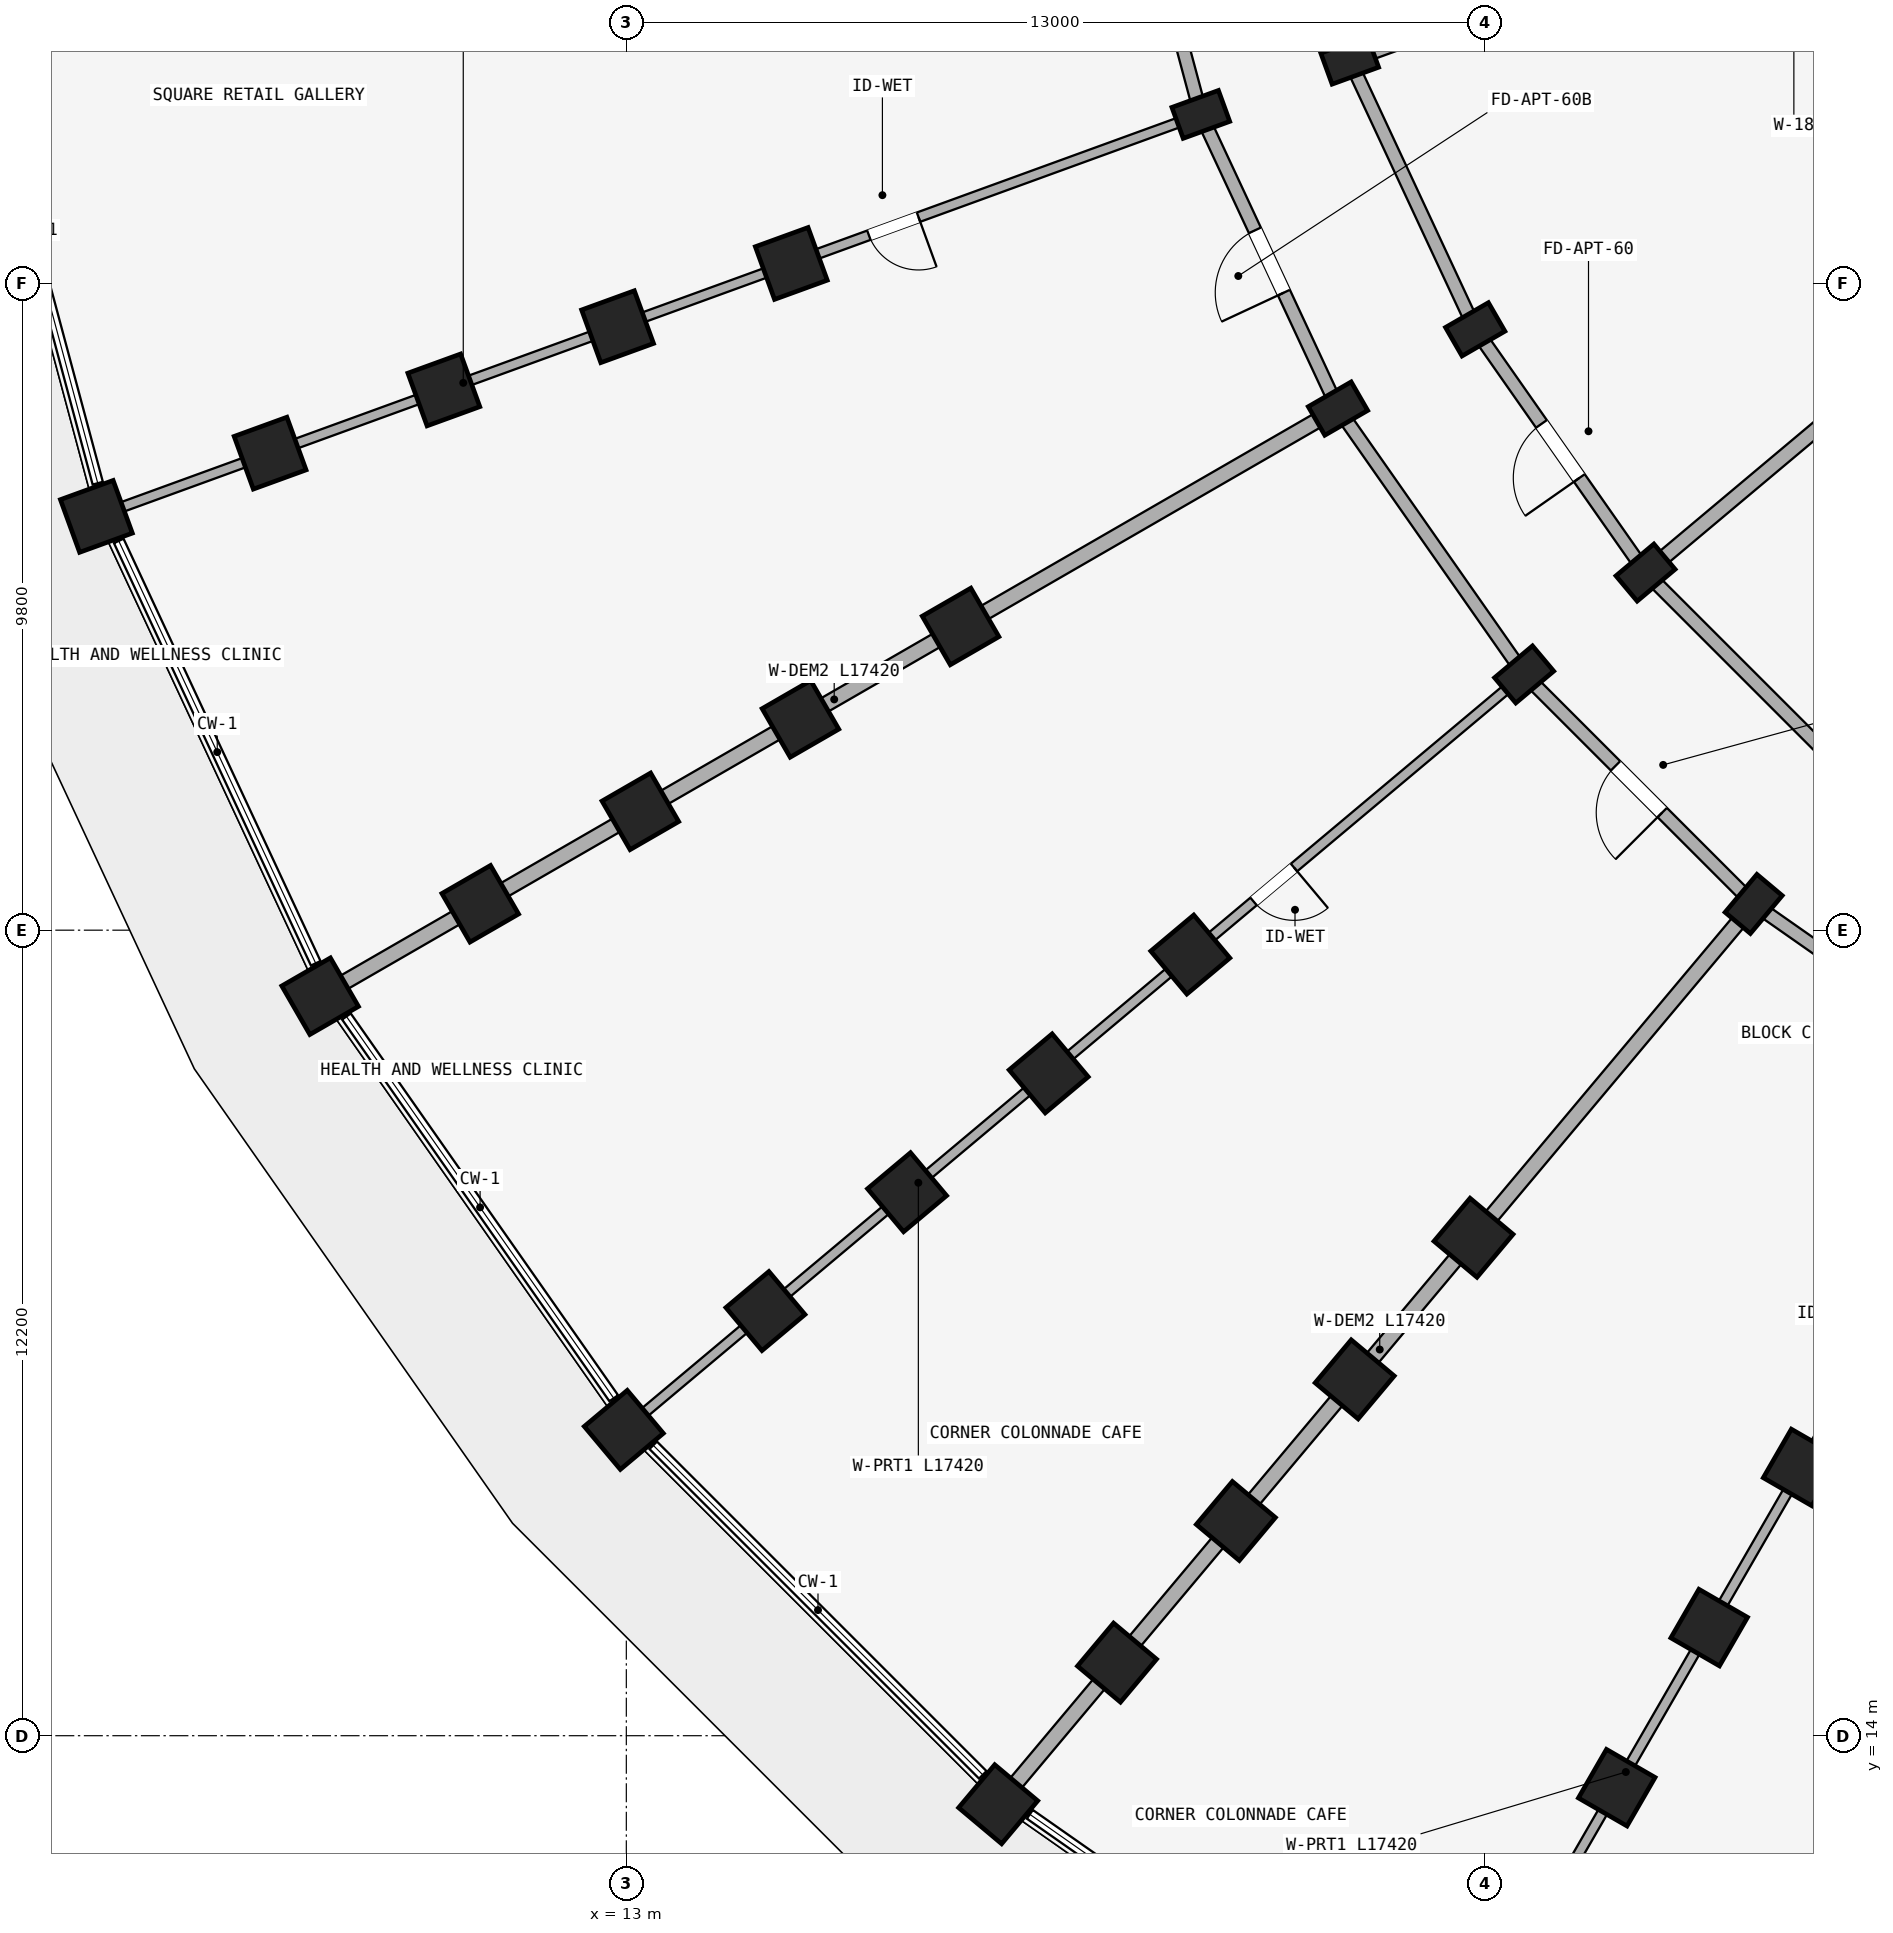
"""IFC4 building model, lengths in metres.
Left out: names, types, materials, properties, quantities, classifications, styles, units other than length and angle.
Written with IfcOpenShell. Run it as: python <this file> out.ifc"""

import sys

from ifc_helpers import new_model, si_unit, direction, frame, frame_2d, origin, origin_2d, place, context, subcontext, project, spatial, rectangle, extrude, element, fill, save


model = new_model("IFC4")
c1 = context("Model", 3, precision=1e-05, world=origin(), true_north=direction((0.0, 1.0)))
c2 = subcontext(c1, "Body", "Model", "MODEL_VIEW")
j1 = project(units=[si_unit("LENGTHUNIT", "METRE"), si_unit("PLANEANGLEUNIT", "RADIAN")], contexts=[c1])
p1 = place(None, origin())
s1 = spatial("IfcSite", under=j1, at=p1, CompositionType="ELEMENT")
p2 = place(p1, origin())
s2 = spatial("IfcBuilding", under=s1, at=p2, CompositionType="ELEMENT")
p3 = place(p2, origin())
s3 = spatial("IfcBuildingStorey", under=s2, at=p3, CompositionType="ELEMENT", Elevation=0.0)
for number, where, z_axis, x_axis in (
    (1, (30.8, 18.062, 0.0), (0.0, 0.0, 1.0), (-0.866, 0.5, 0.0)),
    (2, (29.4, 15.637, 0.0), (0.0, 0.0, 1.0), (-0.866, 0.5, 0.0)),
    (3, (28.0, 13.213, 0.0), (0.0, 0.0, 1.0), (-0.866, 0.5, 0.0)),
):
    element("IfcColumn", number, at=place(p3, frame(where, z_axis=z_axis, x_axis=x_axis)), inside=s3, PredefinedType="COLUMN", context=c2, shape_type="SweptSolid", body=[
        extrude(rectangle(XDim=0.85, YDim=0.85, at=origin_2d()), origin(), (0.0, 0.0, 1.0), 4.15),
    ])
p4 = place(p3, frame((30.073, 26.598, 0.0), z_axis=(0.0, 0.0, 1.0), x_axis=(-0.766044443119, 0.642787609687, 0.0)))
e4 = element("IfcColumn", 4, at=p4, inside=s3, PredefinedType="COLUMN", context=c2, shape_type="SweptSolid", body=[
    extrude(rectangle(XDim=0.5, YDim=0.75, at=origin_2d()), origin(), (0.0, 0.0, 1.0), 4.15),
])
for number, where, z_axis, x_axis in (
    (5, (25.831, 21.542, 0.0), (0.0, 0.0, 1.0), (-0.766, 0.643, 0.0)),
    (6, (24.031, 19.397, 0.0), (0.0, 0.0, 1.0), (-0.766, 0.643, 0.0)),
    (7, (22.231, 17.252, 0.0), (0.0, 0.0, 1.0), (-0.766, 0.643, 0.0)),
    (8, (20.432, 15.107, 0.0), (0.0, 0.0, 1.0), (-0.766, 0.643, 0.0)),
    (9, (18.632, 12.962, 0.0), (0.0, 0.0, 1.0), (-0.766, 0.643, 0.0)),
):
    element("IfcColumn", number, at=place(p3, frame(where, z_axis=z_axis, x_axis=x_axis)), inside=s3, PredefinedType="COLUMN", context=c2, shape_type="SweptSolid", body=[
        extrude(rectangle(XDim=0.85, YDim=0.85, at=origin_2d()), origin(), (0.0, 0.0, 1.0), 4.15),
    ])
for number, where, z_axis, x_axis in (
    (10, (28.436, 31.616, 0.0), (0.0, 0.0, 1.0), (-0.643, 0.766, 0.0)),
    (11, (26.598, 30.073, 0.0), (0.0, 0.0, 1.0), (-0.643, 0.766, 0.0)),
):
    element("IfcColumn", number, at=place(p3, frame(where, z_axis=z_axis, x_axis=x_axis)), inside=s3, PredefinedType="COLUMN", context=c2, shape_type="SweptSolid", body=[
        extrude(rectangle(XDim=0.5, YDim=0.75, at=origin_2d()), origin(), (0.0, 0.0, 1.0), 4.15),
    ])
for number, where, z_axis, x_axis in (
    (12, (21.542, 25.831, 0.0), (0.0, 0.0, 1.0), (-0.643, 0.766, 0.0)),
    (13, (19.397, 24.031, 0.0), (0.0, 0.0, 1.0), (-0.643, 0.766, 0.0)),
    (14, (17.252, 22.231, 0.0), (0.0, 0.0, 1.0), (-0.643, 0.766, 0.0)),
    (15, (15.107, 20.432, 0.0), (0.0, 0.0, 1.0), (-0.643, 0.766, 0.0)),
    (16, (12.962, 18.632, 0.0), (0.0, 0.0, 1.0), (-0.643, 0.766, 0.0)),
):
    element("IfcColumn", number, at=place(p3, frame(where, z_axis=z_axis, x_axis=x_axis)), inside=s3, PredefinedType="COLUMN", context=c2, shape_type="SweptSolid", body=[
        extrude(rectangle(XDim=0.85, YDim=0.85, at=origin_2d()), origin(), (0.0, 0.0, 1.0), 4.15),
    ])
for number, where, z_axis, x_axis in (
    (17, (25.856, 35.3, 0.0), (0.0, 0.0, 1.0), (-0.5, 0.866, 0.0)),
    (18, (23.778, 34.1, 0.0), (0.0, 0.0, 1.0), (-0.5, 0.866, 0.0)),
):
    element("IfcColumn", number, at=place(p3, frame(where, z_axis=z_axis, x_axis=x_axis)), inside=s3, PredefinedType="COLUMN", context=c2, shape_type="SweptSolid", body=[
        extrude(rectangle(XDim=0.5, YDim=0.75, at=origin_2d()), origin(), (0.0, 0.0, 1.0), 4.15),
    ])
for number, where, z_axis, x_axis in (
    (19, (18.062, 30.8, 0.0), (0.0, 0.0, 1.0), (-0.5, 0.866, 0.0)),
    (20, (15.637, 29.4, 0.0), (0.0, 0.0, 1.0), (-0.5, 0.866, 0.0)),
    (21, (13.213, 28.0, 0.0), (0.0, 0.0, 1.0), (-0.5, 0.866, 0.0)),
    (22, (10.788, 26.6, 0.0), (0.0, 0.0, 1.0), (-0.5, 0.866, 0.0)),
    (23, (8.363, 25.2, 0.0), (0.0, 0.0, 1.0), (-0.5, 0.866, 0.0)),
):
    element("IfcColumn", number, at=place(p3, frame(where, z_axis=z_axis, x_axis=x_axis)), inside=s3, PredefinedType="COLUMN", context=c2, shape_type="SweptSolid", body=[
        extrude(rectangle(XDim=0.85, YDim=0.85, at=origin_2d()), origin(), (0.0, 0.0, 1.0), 4.15),
    ])
for number, where, z_axis, x_axis in (
    (24, (23.956, 39.376, 0.0), (0.0, 0.0, 1.0), (-0.342, 0.94, 0.0)),
    (25, (21.701, 38.555, 0.0), (0.0, 0.0, 1.0), (-0.342, 0.94, 0.0)),
):
    element("IfcColumn", number, at=place(p3, frame(where, z_axis=z_axis, x_axis=x_axis)), inside=s3, PredefinedType="COLUMN", context=c2, shape_type="SweptSolid", body=[
        extrude(rectangle(XDim=0.5, YDim=0.75, at=origin_2d()), origin(), (0.0, 0.0, 1.0), 4.15),
    ])
for number, where, z_axis, x_axis in (
    (26, (15.499, 36.298, 0.0), (0.0, 0.0, 1.0), (-0.342, 0.94, 0.0)),
    (27, (12.868, 35.34, 0.0), (0.0, 0.0, 1.0), (-0.342, 0.94, 0.0)),
    (28, (10.236, 34.382, 0.0), (0.0, 0.0, 1.0), (-0.342, 0.94, 0.0)),
    (29, (7.605, 33.425, 0.0), (0.0, 0.0, 1.0), (-0.342, 0.94, 0.0)),
    (30, (4.974, 32.467, 0.0), (0.0, 0.0, 1.0), (-0.342, 0.94, 0.0)),
):
    element("IfcColumn", number, at=place(p3, frame(where, z_axis=z_axis, x_axis=x_axis)), inside=s3, PredefinedType="COLUMN", context=c2, shape_type="SweptSolid", body=[
        extrude(rectangle(XDim=0.85, YDim=0.85, at=origin_2d()), origin(), (0.0, 0.0, 1.0), 4.15),
    ])
p5 = place(p3, frame((34.1, 23.778, 0.0), z_axis=(0.0, 0.0, 1.0), x_axis=(-0.819140911474, 0.573592335331, 0.0)))
e31 = element("IfcWall", 31, at=p5, inside=s3, PredefinedType="STANDARD", context=c2, shape_type="SweptSolid", body=[
    extrude(rectangle(XDim=4.916, YDim=0.2, at=frame_2d((2.458, 0.0))), origin(), (0.0, 0.0, 1.0), 3.492),
])
p6 = place(p3, frame((31.616, 28.436, 0.0), z_axis=(0.0, 0.0, 1.0), x_axis=(-0.707106781187, 0.707106781187, 0.0)))
e32 = element("IfcWall", 32, at=p6, inside=s3, PredefinedType="STANDARD", context=c2, shape_type="SweptSolid", body=[
    extrude(rectangle(XDim=4.497, YDim=0.2, at=frame_2d((2.249, 0.0))), origin(), (0.0, 0.0, 1.0), 3.492),
])
p7 = place(p3, frame((30.073, 26.598, 0.0), z_axis=(0.0, 0.0, 1.0), x_axis=(-0.707106781187, 0.707106781187, 0.0)))
e33 = element("IfcWall", 33, at=p7, inside=s3, PredefinedType="STANDARD", context=c2, shape_type="SweptSolid", body=[
    extrude(rectangle(XDim=4.916, YDim=0.2, at=frame_2d((2.458, 0.0))), origin(), (0.0, 0.0, 1.0), 3.492),
])
p8 = place(p7, frame((1.958, 0.0, 0.0)))
e34 = element("IfcOpeningElement", 34, at=p8, cuts=e33, PredefinedType="OPENING", context=c2, shape_type="SweptSolid", body=[
    extrude(rectangle(XDim=1.0, YDim=2.15, at=frame_2d((0.5, 1.075))), frame((0.0, 0.11, 0.0), z_axis=(0.0, -1.0, 0.0), x_axis=(1.0, 0.0, 0.0)), (0.0, 0.0, 1.0), 0.22),
])
p9 = place(p3, frame((28.436, 31.616, 0.0), z_axis=(0.0, 0.0, 1.0), x_axis=(-0.573571637217, 0.819155404658, 0.0)))
e35 = element("IfcWall", 35, at=p9, inside=s3, PredefinedType="STANDARD", context=c2, shape_type="SweptSolid", body=[
    extrude(rectangle(XDim=4.497, YDim=0.2, at=frame_2d((2.249, 0.0))), origin(), (0.0, 0.0, 1.0), 3.492),
])
p10 = place(p9, frame((1.749, 0.0, 0.0)))
e36 = element("IfcOpeningElement", 36, at=p10, cuts=e35, PredefinedType="OPENING", context=c2, shape_type="SweptSolid", body=[
    extrude(rectangle(XDim=1.0, YDim=2.15, at=frame_2d((0.5, 1.075))), frame((0.0, 0.11, 0.0), z_axis=(0.0, -1.0, 0.0), x_axis=(1.0, 0.0, 0.0)), (0.0, 0.0, 1.0), 0.22),
])
p11 = place(p3, frame((26.598, 30.073, 0.0), z_axis=(0.0, 0.0, 1.0), x_axis=(-0.573592335331, 0.819140911474, 0.0)))
e37 = element("IfcWall", 37, at=p11, inside=s3, PredefinedType="STANDARD", context=c2, shape_type="SweptSolid", body=[
    extrude(rectangle(XDim=4.916, YDim=0.2, at=frame_2d((2.458, 0.0))), origin(), (0.0, 0.0, 1.0), 3.492),
])
p12 = place(p3, frame((25.856, 35.3, 0.0), z_axis=(0.0, 0.0, 1.0), x_axis=(-0.422617978463, 0.906307919131, 0.0)))
e38 = element("IfcWall", 38, at=p12, inside=s3, PredefinedType="STANDARD", context=c2, shape_type="SweptSolid", body=[
    extrude(rectangle(XDim=4.497, YDim=0.2, at=frame_2d((2.249, 0.0))), origin(), (0.0, 0.0, 1.0), 3.492),
])
p13 = place(p3, frame((23.778, 34.1, 0.0), z_axis=(0.0, 0.0, 1.0), x_axis=(-0.422629854778, 0.906302381024, 0.0)))
e39 = element("IfcWall", 39, at=p13, inside=s3, PredefinedType="STANDARD", context=c2, shape_type="SweptSolid", body=[
    extrude(rectangle(XDim=4.915, YDim=0.2, at=frame_2d((2.458, 0.0))), origin(), (0.0, 0.0, 1.0), 3.492),
])
p14 = place(p13, frame((1.938, 0.0, 0.0)))
e40 = element("IfcOpeningElement", 40, at=p14, cuts=e39, PredefinedType="OPENING", context=c2, shape_type="SweptSolid", body=[
    extrude(rectangle(XDim=1.04, YDim=2.15, at=frame_2d((0.52, 1.075))), frame((0.0, 0.11, 0.0), z_axis=(0.0, -1.0, 0.0), x_axis=(1.0, 0.0, 0.0)), (0.0, 0.0, 1.0), 0.22),
])
p15 = place(p3, frame((23.956, 39.376, 0.0), z_axis=(0.0, 0.0, 1.0), x_axis=(-0.258787642463, 0.965934240054, 0.0)))
e41 = element("IfcWall", 41, at=p15, inside=s3, PredefinedType="STANDARD", context=c2, shape_type="SweptSolid", body=[
    extrude(rectangle(XDim=4.497, YDim=0.2, at=frame_2d((2.249, 0.0))), origin(), (0.0, 0.0, 1.0), 3.492),
])
p16 = place(p15, frame((1.729, 0.0, 0.0)))
e42 = element("IfcOpeningElement", 42, at=p16, cuts=e41, PredefinedType="OPENING", context=c2, shape_type="SweptSolid", body=[
    extrude(rectangle(XDim=1.04, YDim=2.15, at=frame_2d((0.52, 1.075))), frame((0.0, 0.11, 0.0), z_axis=(0.0, -1.0, 0.0), x_axis=(1.0, 0.0, 0.0)), (0.0, 0.0, 1.0), 0.22),
])
p17 = place(p3, frame((21.701, 38.555, 0.0), z_axis=(0.0, 0.0, 1.0), x_axis=(-0.258803112091, 0.965930095386, 0.0)))
e43 = element("IfcWall", 43, at=p17, inside=s3, PredefinedType="STANDARD", context=c2, shape_type="SweptSolid", body=[
    extrude(rectangle(XDim=4.916, YDim=0.2, at=frame_2d((2.458, 0.0))), origin(), (0.0, 0.0, 1.0), 3.492),
])
p18 = place(p3, frame((34.05, 23.691, 0.0), z_axis=(0.0, 0.0, 1.0), x_axis=(-0.499997843263, -0.866026648973, 0.0)))
e44 = element("IfcWall", 44, at=p18, inside=s3, PredefinedType="PARTITIONING", context=c2, shape_type="SweptSolid", body=[
    extrude(rectangle(XDim=17.42, YDim=0.15, at=frame_2d((8.71, 0.0))), origin(), (0.0, 0.0, 1.0), 2.942),
])
p19 = place(p18, frame((4.45, 0.0, 0.0)))
e45 = element("IfcOpeningElement", 45, at=p19, cuts=e44, PredefinedType="OPENING", context=c2, shape_type="SweptSolid", body=[
    extrude(rectangle(XDim=0.8, YDim=2.1, at=frame_2d((0.4, 1.05))), frame((0.0, 0.085, 0.0), z_axis=(0.0, -1.0, 0.0), x_axis=(1.0, 0.0, 0.0)), (0.0, 0.0, 1.0), 0.17),
])
p20 = place(p3, frame((30.009, 26.521, 0.0), z_axis=(0.0, 0.0, 1.0), x_axis=(-0.642784757967, -0.766046835987, 0.0)))
e46 = element("IfcWall", 46, at=p20, inside=s3, PredefinedType="STANDARD", context=c2, shape_type="SweptSolid", body=[
    extrude(rectangle(XDim=17.42, YDim=0.23, at=frame_2d((8.71, 0.0))), origin(), (0.0, 0.0, 1.0), 3.492),
])
p21 = place(p3, frame((33.645, 35.987, 0.0), z_axis=(0.0, 0.0, 1.0), x_axis=(-0.766046761698, -0.642784846501, 0.0)))
e47 = element("IfcWall", 47, at=p21, inside=s3, PredefinedType="STANDARD", context=c2, shape_type="SweptSolid", body=[
    extrude(rectangle(XDim=6.75, YDim=0.22, at=frame_2d((3.375, 0.0))), origin(), (0.0, 0.0, 1.0), 3.492),
])
p22 = place(p3, frame((26.521, 30.009, 0.0), z_axis=(0.0, 0.0, 1.0), x_axis=(-0.766046835987, -0.642784757967, 0.0)))
e48 = element("IfcWall", 48, at=p22, inside=s3, PredefinedType="PARTITIONING", context=c2, shape_type="SweptSolid", body=[
    extrude(rectangle(XDim=17.42, YDim=0.15, at=frame_2d((8.71, 0.0))), origin(), (0.0, 0.0, 1.0), 3.492),
])
p23 = place(p22, frame((4.45, 0.0, 0.0)))
e49 = element("IfcOpeningElement", 49, at=p23, cuts=e48, PredefinedType="OPENING", context=c2, shape_type="SweptSolid", body=[
    extrude(rectangle(XDim=0.8, YDim=2.1, at=frame_2d((0.4, 1.05))), frame((0.0, 0.085, 0.0), z_axis=(0.0, -1.0, 0.0), x_axis=(1.0, 0.0, 0.0)), (0.0, 0.0, 1.0), 0.17),
])
p24 = place(p3, frame((23.691, 34.05, 0.0), z_axis=(0.0, 0.0, 1.0), x_axis=(-0.866026648973, -0.499997843263, 0.0)))
e50 = element("IfcWall", 50, at=p24, inside=s3, PredefinedType="STANDARD", context=c2, shape_type="SweptSolid", body=[
    extrude(rectangle(XDim=17.42, YDim=0.23, at=frame_2d((8.71, 0.0))), origin(), (0.0, 0.0, 1.0), 3.492),
])
p25 = place(p3, frame((30.346, 41.702, 0.0), z_axis=(0.0, 0.0, 1.0), x_axis=(-0.939696231917, -0.342010221662, 0.0)))
e51 = element("IfcWall", 51, at=p25, inside=s3, PredefinedType="STANDARD", context=c2, shape_type="SweptSolid", body=[
    extrude(rectangle(XDim=6.75, YDim=0.22, at=frame_2d((3.375, 0.0))), origin(), (0.0, 0.0, 1.0), 3.492),
])
p26 = place(p3, frame((21.607, 38.521, 0.0), z_axis=(0.0, 0.0, 1.0), x_axis=(-0.939691901159, -0.342022120477, 0.0)))
e52 = element("IfcWall", 52, at=p26, inside=s3, PredefinedType="PARTITIONING", context=c2, shape_type="SweptSolid", body=[
    extrude(rectangle(XDim=17.42, YDim=0.15, at=frame_2d((8.71, 0.0))), origin(), (0.0, 0.0, 1.0), 3.492),
])
p27 = place(p26, frame((4.45, 0.0, 0.0)))
e53 = element("IfcOpeningElement", 53, at=p27, cuts=e52, PredefinedType="OPENING", context=c2, shape_type="SweptSolid", body=[
    extrude(rectangle(XDim=0.8, YDim=2.1, at=frame_2d((0.4, 1.05))), frame((0.0, 0.085, 0.0), z_axis=(0.0, -1.0, 0.0), x_axis=(1.0, 0.0, 0.0)), (0.0, 0.0, 1.0), 0.17),
])
p28 = place(p3, frame((31.677, 39.022, 0.0), z_axis=(0.0, 0.0, 1.0), x_axis=(-0.422610081738, 0.90631160139, 0.0)))
e54 = element("IfcWall", 54, at=p28, inside=s3, PredefinedType="STANDARD", context=c2, shape_type="SweptSolid", body=[
    extrude(rectangle(XDim=2.669, YDim=0.25, at=frame_2d((1.335, 0.0))), origin(), (0.0, 0.0, 1.0), 3.692),
])
p29 = place(p28, frame((0.56, 0.0, 0.88)))
e55 = element("IfcOpeningElement", 55, at=p29, cuts=e54, PredefinedType="OPENING", context=c2, shape_type="SweptSolid", body=[
    extrude(rectangle(XDim=1.55, YDim=1.6, at=frame_2d((0.775, 0.8))), frame((0.0, 0.135, 0.0), z_axis=(0.0, -1.0, 0.0), x_axis=(1.0, 0.0, 0.0)), (0.0, 0.0, 1.0), 0.27),
])
p30 = place(p23, frame((0.8, 0.0, 0.0), z_axis=(0.0, 0.0, 1.0), x_axis=(-1.0, 0.0, 0.0)))
e56 = element("IfcDoor", 56, at=p30, inside=s3, OperationType="SINGLE_SWING_RIGHT", PredefinedType="DOOR", context=c2, shape_type="SweptSolid", body=[
    extrude(rectangle(XDim=0.8, YDim=2.1, at=frame_2d((0.4, 1.05))), frame((0.0, 0.025, 0.0), z_axis=(0.0, -1.0, 0.0), x_axis=(1.0, 0.0, 0.0)), (0.0, 0.0, 1.0), 0.05),
])
fill(e49, e56)
p31 = place(p27, origin())
e57 = element("IfcDoor", 57, at=p31, inside=s3, OperationType="SINGLE_SWING_LEFT", PredefinedType="DOOR", context=c2, shape_type="SweptSolid", body=[
    extrude(rectangle(XDim=0.8, YDim=2.1, at=frame_2d((0.4, 1.05))), frame((0.0, 0.025, 0.0), z_axis=(0.0, -1.0, 0.0), x_axis=(1.0, 0.0, 0.0)), (0.0, 0.0, 1.0), 0.05),
])
fill(e53, e57)
p32 = place(p8, origin())
e58 = element("IfcDoor", 58, at=p32, inside=s3, OperationType="SINGLE_SWING_LEFT", PredefinedType="DOOR", context=c2, shape_type="SweptSolid", body=[
    extrude(rectangle(XDim=1.0, YDim=2.15, at=frame_2d((0.5, 1.075))), frame((0.0, 0.025, 0.0), z_axis=(0.0, -1.0, 0.0), x_axis=(1.0, 0.0, 0.0)), (0.0, 0.0, 1.0), 0.05),
])
fill(e34, e58)
p33 = place(p14, frame((1.04, 0.0, 0.0), z_axis=(0.0, 0.0, 1.0), x_axis=(-1.0, 0.0, 0.0)))
e59 = element("IfcDoor", 59, at=p33, inside=s3, OperationType="SINGLE_SWING_RIGHT", PredefinedType="DOOR", context=c2, shape_type="SweptSolid", body=[
    extrude(rectangle(XDim=1.04, YDim=2.15, at=frame_2d((0.52, 1.075))), frame((0.0, 0.025, 0.0), z_axis=(0.0, -1.0, 0.0), x_axis=(1.0, 0.0, 0.0)), (0.0, 0.0, 1.0), 0.05),
])
fill(e40, e59)
p34 = place(p10, origin())
e60 = element("IfcDoor", 60, at=p34, inside=s3, OperationType="SINGLE_SWING_LEFT", PredefinedType="DOOR", context=c2, shape_type="SweptSolid", body=[
    extrude(rectangle(XDim=1.0, YDim=2.15, at=frame_2d((0.5, 1.075))), frame((0.0, 0.025, 0.0), z_axis=(0.0, -1.0, 0.0), x_axis=(1.0, 0.0, 0.0)), (0.0, 0.0, 1.0), 0.05),
])
fill(e36, e60)
save(model, sys.argv[1])
